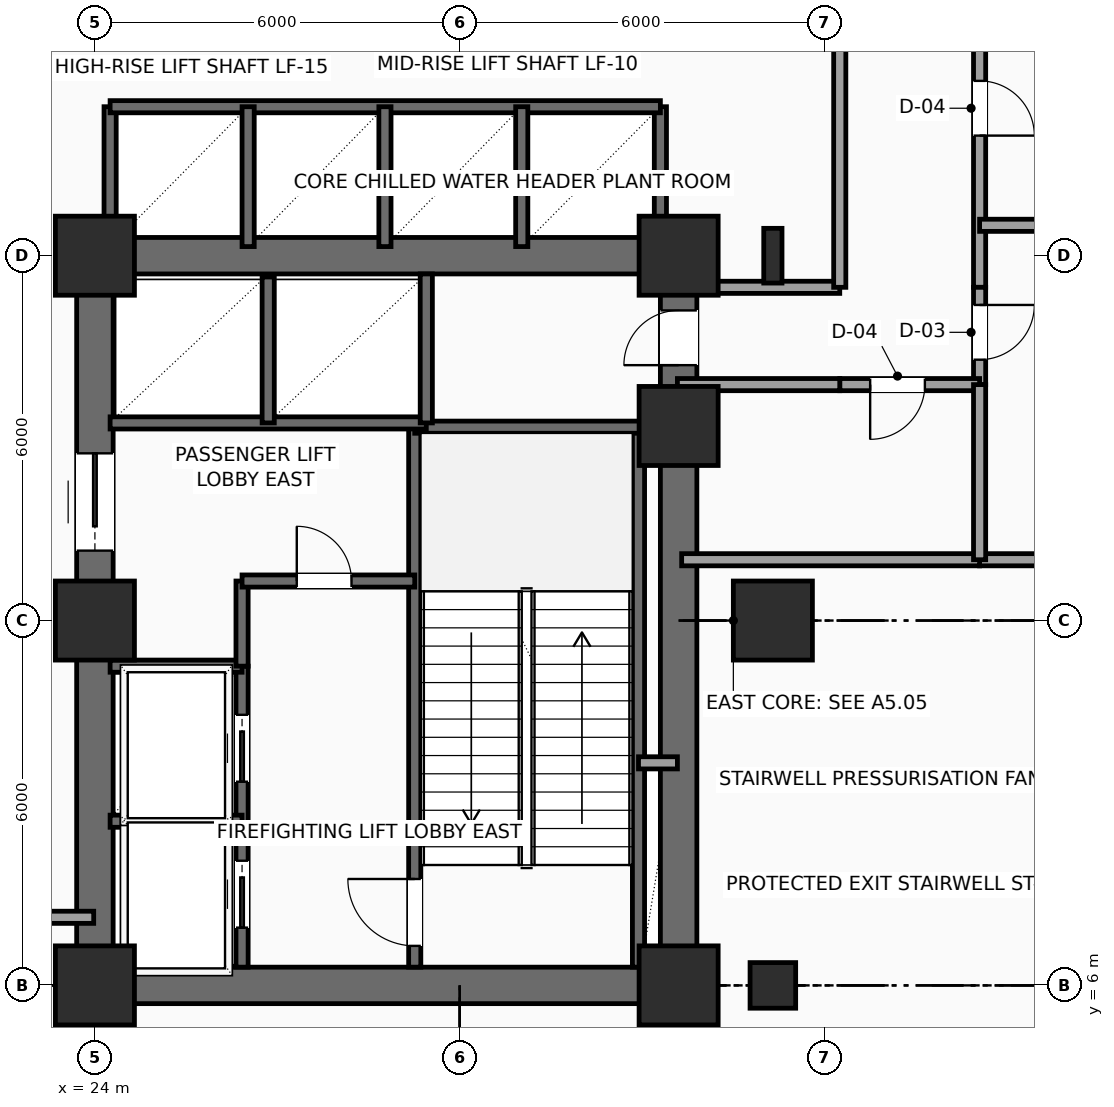
"""IFC4 building model, lengths in metres.
Left out: names, types, materials, properties, quantities, classifications, styles, units other than length and angle.
Written with IfcOpenShell. Run it as: python <this file> out.ifc"""

import sys

from ifc_helpers import new_model, si_unit, direction, frame, frame_2d, origin, origin_2d, place, context, subcontext, project, spatial, rectangle, hollow_rectangle, i_section, extrude, element, fill, save


model = new_model("IFC4")
c1 = context("Model", 3, precision=1e-05, world=origin(), true_north=direction((0.0, 1.0)))
c2 = subcontext(c1, "Body", "Model", "MODEL_VIEW")
j1 = project(units=[si_unit("LENGTHUNIT", "METRE"), si_unit("PLANEANGLEUNIT", "RADIAN")], contexts=[c1])
p1 = place(None, origin())
s1 = spatial("IfcSite", under=j1, at=p1, CompositionType="ELEMENT")
p2 = place(p1, origin())
s2 = spatial("IfcBuilding", under=s1, at=p2, CompositionType="ELEMENT")
p3 = place(p2, frame((0.0, 0.0, 94.8)))
s3 = spatial("IfcBuildingStorey", under=s2, at=p3, CompositionType="ELEMENT", Elevation=94.8)
for number, where, z_axis, x_axis in (
    (1, (24.0, 6.0, 0.0), (0.0, 0.0, 1.0), (1.0, 0.0, 0.0)),
    (2, (24.0, 12.0, 0.0), (0.0, 0.0, 1.0), (1.0, 0.0, 0.0)),
    (3, (24.0, 18.0, 0.0), (0.0, 0.0, 1.0), (1.0, 0.0, 0.0)),
    (4, (33.6, 6.0, 0.0), (0.0, 0.0, 1.0), (1.0, 0.0, 0.0)),
    (5, (33.6, 15.2, 0.0), (0.0, 0.0, 1.0), (1.0, 0.0, 0.0)),
    (6, (33.6, 18.0, 0.0), (0.0, 0.0, 1.0), (1.0, 0.0, 0.0)),
):
    element("IfcColumn", number, at=place(p3, frame(where, z_axis=z_axis, x_axis=x_axis)), inside=s3, PredefinedType="COLUMN", context=c2, shape_type="SweptSolid", body=[
        extrude(rectangle(XDim=1.3, YDim=1.3, at=origin_2d()), origin(), (0.0, 0.0, 1.0), 4.8),
    ])
p4 = place(p3, frame((35.15, 6.0, 0.0), z_axis=(0.0, 0.0, 1.0), x_axis=(1.0, 0.0, 0.0)))
e7 = element("IfcColumn", 7, at=p4, inside=s3, PredefinedType="COLUMN", context=c2, shape_type="SweptSolid", body=[
    extrude(hollow_rectangle(XDim=0.75, YDim=0.75, WallThickness=0.035, InnerFilletRadius=0.035, OuterFilletRadius=0.05, at=origin_2d()), origin(), (0.0, 0.0, 1.0), 4.8),
])
p5 = place(p3, frame((35.15, 12.0, 0.0), z_axis=(0.0, 0.0, 1.0), x_axis=(1.0, 0.0, 0.0)))
e8 = element("IfcColumn", 8, at=p5, inside=s3, PredefinedType="COLUMN", context=c2, shape_type="SweptSolid", body=[
    extrude(rectangle(XDim=1.3, YDim=1.3, at=origin_2d()), origin(), (0.0, 0.0, 1.0), 4.8),
])
p6 = place(p3, frame((35.15, 18.0, 0.0), z_axis=(0.0, 0.0, 1.0), x_axis=(1.0, 0.0, 0.0)))
e9 = element("IfcColumn", 9, at=p6, inside=s3, PredefinedType="COLUMN", context=c2, shape_type="SweptSolid", body=[
    extrude(i_section(OverallWidth=0.3, OverallDepth=0.9, WebThickness=0.019, FlangeThickness=0.035, FilletRadius=0.03, at=origin_2d()), origin(), (0.0, 0.0, 1.0), 4.8),
])
for number, where, z_axis, x_axis in (
    (10, (24.0, 6.0, 0.0), (0.0, 0.0, 1.0), (1.0, 0.0, 0.0)),
    (11, (24.0, 18.0, 0.0), (0.0, 0.0, 1.0), (1.0, 0.0, 0.0)),
):
    element("IfcWall", number, at=place(p3, frame(where, z_axis=z_axis, x_axis=x_axis)), inside=s3, PredefinedType="SHEAR", context=c2, shape_type="SweptSolid", body=[
        extrude(rectangle(XDim=9.6, YDim=0.6, at=frame_2d((4.8, 0.0))), origin(), (0.0, 0.0, 1.0), 4.575),
    ])
p7 = place(p3, frame((24.0, 6.0, 0.0), z_axis=(0.0, 0.0, 1.0), x_axis=(0.0, 1.0, 0.0)))
e12 = element("IfcWall", 12, at=p7, inside=s3, PredefinedType="SHEAR", context=c2, shape_type="SweptSolid", body=[
    extrude(rectangle(XDim=12.0, YDim=0.6, at=frame_2d((6.0, 0.0))), origin(), (0.0, 0.0, 1.0), 4.575),
])
p8 = place(p7, frame((7.15, 0.0, 0.0)))
e13 = element("IfcOpeningElement", 13, at=p8, cuts=e12, PredefinedType="OPENING", context=c2, shape_type="SweptSolid", body=[
    extrude(rectangle(XDim=1.6, YDim=2.3, at=frame_2d((0.8, 1.15))), frame((0.0, 0.31, 0.0), z_axis=(0.0, -1.0, 0.0), x_axis=(1.0, 0.0, 0.0)), (0.0, 0.0, 1.0), 0.62),
])
p9 = place(p3, frame((33.6, 6.0, 0.0), z_axis=(0.0, 0.0, 1.0), x_axis=(0.0, 1.0, 0.0)))
e14 = element("IfcWall", 14, at=p9, inside=s3, PredefinedType="SHEAR", context=c2, shape_type="SweptSolid", body=[
    extrude(rectangle(XDim=12.0, YDim=0.6, at=frame_2d((6.0, 0.0))), origin(), (0.0, 0.0, 1.0), 4.575),
])
p10 = place(p9, frame((10.2, 0.0, 0.0)))
e15 = element("IfcOpeningElement", 15, at=p10, cuts=e14, PredefinedType="OPENING", context=c2, shape_type="SweptSolid", body=[
    extrude(rectangle(XDim=0.9, YDim=2.15, at=frame_2d((0.45, 1.075))), frame((0.0, 0.31, 0.0), z_axis=(0.0, -1.0, 0.0), x_axis=(1.0, 0.0, 0.0)), (0.0, 0.0, 1.0), 0.62),
])
p11 = place(p3, frame((29.26, 6.3, 0.0), z_axis=(0.0, 0.0, 1.0), x_axis=(0.0, 1.0, 0.0)))
e16 = element("IfcWall", 16, at=p11, inside=s3, PredefinedType="SHEAR", context=c2, shape_type="SweptSolid", body=[
    extrude(rectangle(XDim=8.88, YDim=0.2, at=frame_2d((4.44, 0.0))), origin(), (0.0, 0.0, 1.0), 4.575),
])
p12 = place(p11, frame((0.35, 0.0, 0.0)))
e17 = element("IfcOpeningElement", 17, at=p12, cuts=e16, PredefinedType="OPENING", context=c2, shape_type="SweptSolid", body=[
    extrude(rectangle(XDim=1.1, YDim=2.2, at=frame_2d((0.55, 1.1))), frame((0.0, 0.11, 0.0), z_axis=(0.0, -1.0, 0.0), x_axis=(1.0, 0.0, 0.0)), (0.0, 0.0, 1.0), 0.22),
])
p13 = place(p3, frame((32.94, 6.3, 0.0), z_axis=(0.0, 0.0, 1.0), x_axis=(0.0, 1.0, 0.0)))
e18 = element("IfcWall", 18, at=p13, inside=s3, PredefinedType="SHEAR", context=c2, shape_type="SweptSolid", body=[
    extrude(rectangle(XDim=8.88, YDim=0.2, at=frame_2d((4.44, 0.0))), origin(), (0.0, 0.0, 1.0), 4.575),
])
p14 = place(p3, frame((29.26, 15.18, 0.0), z_axis=(0.0, 0.0, 1.0), x_axis=(1.0, 0.0, 0.0)))
e19 = element("IfcWall", 19, at=p14, inside=s3, PredefinedType="SHEAR", context=c2, shape_type="SweptSolid", body=[
    extrude(rectangle(XDim=4.04, YDim=0.2, at=frame_2d((2.02, 0.0))), origin(), (0.0, 0.0, 1.0), 4.575),
])
p15 = place(p3, frame((26.42, 6.3, 0.0), z_axis=(0.0, 0.0, 1.0), x_axis=(0.0, 1.0, 0.0)))
e20 = element("IfcWall", 20, at=p15, inside=s3, PredefinedType="SHEAR", context=c2, shape_type="SweptSolid", body=[
    extrude(rectangle(XDim=4.95, YDim=0.2, at=frame_2d((2.475, 0.0))), origin(), (0.0, 0.0, 1.0), 4.575),
])
p16 = place(p15, frame((0.65, 0.0, 0.0)))
e21 = element("IfcOpeningElement", 21, at=p16, cuts=e20, PredefinedType="OPENING", context=c2, shape_type="SweptSolid", body=[
    extrude(rectangle(XDim=1.1, YDim=2.2, at=frame_2d((0.55, 1.1))), frame((0.0, 0.11, 0.0), z_axis=(0.0, -1.0, 0.0), x_axis=(1.0, 0.0, 0.0)), (0.0, 0.0, 1.0), 0.22),
])
p17 = place(p15, frame((3.05, 0.0, 0.0)))
e22 = element("IfcOpeningElement", 22, at=p17, cuts=e20, PredefinedType="OPENING", context=c2, shape_type="SweptSolid", body=[
    extrude(rectangle(XDim=1.1, YDim=2.2, at=frame_2d((0.55, 1.1))), frame((0.0, 0.11, 0.0), z_axis=(0.0, -1.0, 0.0), x_axis=(1.0, 0.0, 0.0)), (0.0, 0.0, 1.0), 0.22),
])
for number, where, z_axis, x_axis in (
    (23, (24.25, 8.7, 0.0), (0.0, 0.0, 1.0), (1.0, 0.0, 0.0)),
    (24, (24.25, 11.25, 0.0), (0.0, 0.0, 1.0), (1.0, 0.0, 0.0)),
):
    element("IfcWall", number, at=place(p3, frame(where, z_axis=z_axis, x_axis=x_axis)), inside=s3, PredefinedType="SHEAR", context=c2, shape_type="SweptSolid", body=[
        extrude(rectangle(XDim=2.17, YDim=0.2, at=frame_2d((1.085, 0.0))), origin(), (0.0, 0.0, 1.0), 4.575),
    ])
p18 = place(p3, frame((26.42, 11.25, 0.0), z_axis=(0.0, 0.0, 1.0), x_axis=(0.0, 1.0, 0.0)))
e25 = element("IfcWall", 25, at=p18, inside=s3, PredefinedType="SHEAR", context=c2, shape_type="SweptSolid", body=[
    extrude(rectangle(XDim=1.4, YDim=0.2, at=frame_2d((0.7, 0.0))), origin(), (0.0, 0.0, 1.0), 4.575),
])
p19 = place(p3, frame((26.42, 12.65, 0.0), z_axis=(0.0, 0.0, 1.0), x_axis=(1.0, 0.0, 0.0)))
e26 = element("IfcWall", 26, at=p19, inside=s3, PredefinedType="SHEAR", context=c2, shape_type="SweptSolid", body=[
    extrude(rectangle(XDim=2.84, YDim=0.2, at=frame_2d((1.42, 0.0))), origin(), (0.0, 0.0, 1.0), 4.575),
])
p20 = place(p19, frame((0.9, 0.0, 0.0)))
e27 = element("IfcOpeningElement", 27, at=p20, cuts=e26, PredefinedType="OPENING", context=c2, shape_type="SweptSolid", body=[
    extrude(rectangle(XDim=0.9, YDim=2.15, at=frame_2d((0.45, 1.075))), frame((0.0, 0.11, 0.0), z_axis=(0.0, -1.0, 0.0), x_axis=(1.0, 0.0, 0.0)), (0.0, 0.0, 1.0), 0.22),
])
p21 = place(p3, frame((32.94, 9.66, 0.0), z_axis=(0.0, 0.0, 1.0), x_axis=(1.0, 0.0, 0.0)))
e28 = element("IfcWall", 28, at=p21, inside=s3, PredefinedType="SOLIDWALL", context=c2, shape_type="SweptSolid", body=[
    extrude(rectangle(XDim=0.64, YDim=0.2, at=frame_2d((0.32, 0.0))), origin(), (0.0, 0.0, 1.0), 4.575),
])
p22 = place(p3, frame((24.25, 15.25, 0.0), z_axis=(0.0, 0.0, 1.0), x_axis=(1.0, 0.0, 0.0)))
e29 = element("IfcWall", 29, at=p22, inside=s3, PredefinedType="SHEAR", context=c2, shape_type="SweptSolid", body=[
    extrude(rectangle(XDim=5.2, YDim=0.2, at=frame_2d((2.6, 0.0))), origin(), (0.0, 0.0, 1.0), 4.575),
])
p23 = place(p3, frame((26.85, 15.25, 0.0), z_axis=(0.0, 0.0, 1.0), x_axis=(0.0, 1.0, 0.0)))
e30 = element("IfcWall", 30, at=p23, inside=s3, PredefinedType="SHEAR", context=c2, shape_type="SweptSolid", body=[
    extrude(rectangle(XDim=2.4, YDim=0.2, at=frame_2d((1.2, 0.0))), origin(), (0.0, 0.0, 1.0), 4.575),
])
p24 = place(p3, frame((29.45, 15.25, 0.0), z_axis=(0.0, 0.0, 1.0), x_axis=(0.0, 1.0, 0.0)))
e31 = element("IfcWall", 31, at=p24, inside=s3, PredefinedType="SHEAR", context=c2, shape_type="SweptSolid", body=[
    extrude(rectangle(XDim=2.45, YDim=0.2, at=frame_2d((1.225, 0.0))), origin(), (0.0, 0.0, 1.0), 4.575),
])
for number, where, z_axis, x_axis in (
    (32, (33.3, 18.1, 0.0), (0.0, 0.0, 1.0), (0.0, 1.0, 0.0)),
    (33, (24.25, 18.1, 0.0), (0.0, 0.0, 1.0), (0.0, 1.0, 0.0)),
):
    element("IfcWall", number, at=place(p3, frame(where, z_axis=z_axis, x_axis=x_axis)), inside=s3, PredefinedType="SHEAR", context=c2, shape_type="SweptSolid", body=[
        extrude(rectangle(XDim=2.35, YDim=0.2, at=frame_2d((1.175, 0.0))), origin(), (0.0, 0.0, 1.0), 4.575),
    ])
p25 = place(p3, frame((24.25, 20.45, 0.0), z_axis=(0.0, 0.0, 1.0), x_axis=(1.0, 0.0, 0.0)))
e34 = element("IfcWall", 34, at=p25, inside=s3, PredefinedType="SHEAR", context=c2, shape_type="SweptSolid", body=[
    extrude(rectangle(XDim=9.05, YDim=0.2, at=frame_2d((4.525, 0.0))), origin(), (0.0, 0.0, 1.0), 4.575),
])
for number, where, z_axis, x_axis in (
    (35, (26.52, 18.15, 0.0), (0.0, 0.0, 1.0), (0.0, 1.0, 0.0)),
    (36, (28.77, 18.15, 0.0), (0.0, 0.0, 1.0), (0.0, 1.0, 0.0)),
    (37, (31.02, 18.15, 0.0), (0.0, 0.0, 1.0), (0.0, 1.0, 0.0)),
):
    element("IfcWall", number, at=place(p3, frame(where, z_axis=z_axis, x_axis=x_axis)), inside=s3, PredefinedType="SHEAR", context=c2, shape_type="SweptSolid", body=[
        extrude(rectangle(XDim=2.3, YDim=0.2, at=frame_2d((1.15, 0.0))), origin(), (0.0, 0.0, 1.0), 4.575),
    ])
p26 = place(p3, frame((38.55, 21.6, 0.0), z_axis=(0.0, 0.0, 1.0), x_axis=(0.0, -1.0, 0.0)))
e38 = element("IfcWall", 38, at=p26, inside=s3, PredefinedType="SOLIDWALL", context=c2, shape_type="SweptSolid", body=[
    extrude(rectangle(XDim=4.12, YDim=0.2, at=frame_2d((2.06, 0.0))), origin(), (0.0, 0.0, 1.0), 4.575),
])
p27 = place(p26, frame((0.725, 0.0, 0.0)))
e39 = element("IfcOpeningElement", 39, at=p27, cuts=e38, PredefinedType="OPENING", context=c2, shape_type="SweptSolid", body=[
    extrude(rectangle(XDim=0.9, YDim=2.15, at=frame_2d((0.45, 1.075))), frame((0.0, 0.11, 0.0), z_axis=(0.0, -1.0, 0.0), x_axis=(1.0, 0.0, 0.0)), (0.0, 0.0, 1.0), 0.22),
])
p28 = place(p3, frame((38.55, 17.48, 0.0), z_axis=(0.0, 0.0, 1.0), x_axis=(0.0, -1.0, 0.0)))
e40 = element("IfcWall", 40, at=p28, inside=s3, PredefinedType="SOLIDWALL", context=c2, shape_type="SweptSolid", body=[
    extrude(rectangle(XDim=1.6, YDim=0.2, at=frame_2d((0.8, 0.0))), origin(), (0.0, 0.0, 1.0), 4.575),
])
p29 = place(p28, frame((0.29, 0.0, 0.0)))
e41 = element("IfcOpeningElement", 41, at=p29, cuts=e40, PredefinedType="OPENING", context=c2, shape_type="SweptSolid", body=[
    extrude(rectangle(XDim=0.9, YDim=2.15, at=frame_2d((0.45, 1.075))), frame((0.0, 0.11, 0.0), z_axis=(0.0, -1.0, 0.0), x_axis=(1.0, 0.0, 0.0)), (0.0, 0.0, 1.0), 0.22),
])
p30 = place(p3, frame((38.55, 15.88, 0.0), z_axis=(0.0, 0.0, 1.0), x_axis=(-1.0, 0.0, 0.0)))
e42 = element("IfcWall", 42, at=p30, inside=s3, PredefinedType="SOLIDWALL", context=c2, shape_type="SweptSolid", body=[
    extrude(rectangle(XDim=2.3, YDim=0.2, at=frame_2d((1.15, 0.0))), origin(), (0.0, 0.0, 1.0), 4.575),
])
p31 = place(p30, frame((0.9, 0.0, 0.0)))
e43 = element("IfcOpeningElement", 43, at=p31, cuts=e42, PredefinedType="OPENING", context=c2, shape_type="SweptSolid", body=[
    extrude(rectangle(XDim=0.9, YDim=2.15, at=frame_2d((0.45, 1.075))), frame((0.0, 0.11, 0.0), z_axis=(0.0, -1.0, 0.0), x_axis=(1.0, 0.0, 0.0)), (0.0, 0.0, 1.0), 0.22),
])
for number, where, z_axis, x_axis in (
    (44, (36.25, 15.88, 0.0), (0.0, 0.0, 1.0), (-1.0, 0.0, 0.0)),
    (45, (33.58, 17.48, 0.0), (0.0, 0.0, 1.0), (1.0, 0.0, 0.0)),
):
    element("IfcWall", number, at=place(p3, frame(where, z_axis=z_axis, x_axis=x_axis)), inside=s3, PredefinedType="SOLIDWALL", context=c2, shape_type="SweptSolid", body=[
        extrude(rectangle(XDim=2.67, YDim=0.2, at=frame_2d((1.335, 0.0))), origin(), (0.0, 0.0, 1.0), 4.575),
    ])
p32 = place(p3, frame((36.25, 17.48, 0.0), z_axis=(0.0, 0.0, 1.0), x_axis=(0.0, 1.0, 0.0)))
e46 = element("IfcWall", 46, at=p32, inside=s3, PredefinedType="SOLIDWALL", context=c2, shape_type="SweptSolid", body=[
    extrude(rectangle(XDim=4.12, YDim=0.2, at=frame_2d((2.06, 0.0))), origin(), (0.0, 0.0, 1.0), 4.575),
])
p33 = place(p3, frame((23.98, 7.12, 0.0), z_axis=(0.0, 0.0, 1.0), x_axis=(-1.0, 0.0, 0.0)))
e47 = element("IfcWall", 47, at=p33, inside=s3, PredefinedType="SOLIDWALL", context=c2, shape_type="SweptSolid", body=[
    extrude(rectangle(XDim=3.23, YDim=0.2, at=frame_2d((1.615, 0.0))), origin(), (0.0, 0.0, 1.0), 4.575),
])
for number, where, z_axis, x_axis in (
    (48, (38.55, 13.0, 0.0), (0.0, 0.0, 1.0), (1.0, 0.0, 0.0)),
    (49, (38.55, 18.5, 0.0), (0.0, 0.0, 1.0), (1.0, 0.0, 0.0)),
):
    element("IfcWall", number, at=place(p3, frame(where, z_axis=z_axis, x_axis=x_axis)), inside=s3, PredefinedType="SOLIDWALL", context=c2, shape_type="SweptSolid", body=[
        extrude(rectangle(XDim=14.6, YDim=0.2, at=frame_2d((7.3, 0.0))), origin(), (0.0, 0.0, 1.0), 4.575),
    ])
p34 = place(p3, frame((33.65, 13.0, 0.0), z_axis=(0.0, 0.0, 1.0), x_axis=(1.0, 0.0, 0.0)))
e50 = element("IfcWall", 50, at=p34, inside=s3, PredefinedType="SOLIDWALL", context=c2, shape_type="SweptSolid", body=[
    extrude(rectangle(XDim=4.9, YDim=0.2, at=frame_2d((2.45, 0.0))), origin(), (0.0, 0.0, 1.0), 4.575),
])
p35 = place(p3, frame((38.55, 13.0, 0.0), z_axis=(0.0, 0.0, 1.0), x_axis=(0.0, 1.0, 0.0)))
e51 = element("IfcWall", 51, at=p35, inside=s3, PredefinedType="SOLIDWALL", context=c2, shape_type="SweptSolid", body=[
    extrude(rectangle(XDim=2.88, YDim=0.2, at=frame_2d((1.44, 0.0))), origin(), (0.0, 0.0, 1.0), 4.575),
])
p36 = place(p8, origin())
e52 = element("IfcDoor", 52, at=p36, inside=s3, OperationType="DOUBLE_DOOR_SLIDING", PredefinedType="DOOR", context=c2, shape_type="SweptSolid", body=[
    extrude(rectangle(XDim=1.6, YDim=2.3, at=frame_2d((0.8, 1.15))), frame((0.0, 0.025, 0.0), z_axis=(0.0, -1.0, 0.0), x_axis=(1.0, 0.0, 0.0)), (0.0, 0.0, 1.0), 0.05),
])
fill(e13, e52)
p37 = place(p10, origin())
e53 = element("IfcDoor", 53, at=p37, inside=s3, OperationType="SINGLE_SWING_LEFT", PredefinedType="DOOR", context=c2, shape_type="SweptSolid", body=[
    extrude(rectangle(XDim=0.9, YDim=2.15, at=frame_2d((0.45, 1.075))), frame((0.0, 0.025, 0.0), z_axis=(0.0, -1.0, 0.0), x_axis=(1.0, 0.0, 0.0)), (0.0, 0.0, 1.0), 0.05),
])
fill(e15, e53)
p38 = place(p12, origin())
e54 = element("IfcDoor", 54, at=p38, inside=s3, OperationType="SINGLE_SWING_RIGHT", PredefinedType="DOOR", context=c2, shape_type="SweptSolid", body=[
    extrude(rectangle(XDim=1.1, YDim=2.2, at=frame_2d((0.55, 1.1))), frame((0.0, 0.025, 0.0), z_axis=(0.0, -1.0, 0.0), x_axis=(1.0, 0.0, 0.0)), (0.0, 0.0, 1.0), 0.05),
])
fill(e17, e54)
p39 = place(p16, origin())
e55 = element("IfcDoor", 55, at=p39, inside=s3, OperationType="SLIDING_TO_LEFT", PredefinedType="DOOR", context=c2, shape_type="SweptSolid", body=[
    extrude(rectangle(XDim=1.1, YDim=2.2, at=frame_2d((0.55, 1.1))), frame((0.0, 0.025, 0.0), z_axis=(0.0, -1.0, 0.0), x_axis=(1.0, 0.0, 0.0)), (0.0, 0.0, 1.0), 0.05),
])
fill(e21, e55)
p40 = place(p17, origin())
e56 = element("IfcDoor", 56, at=p40, inside=s3, OperationType="SLIDING_TO_LEFT", PredefinedType="DOOR", context=c2, shape_type="SweptSolid", body=[
    extrude(rectangle(XDim=1.1, YDim=2.2, at=frame_2d((0.55, 1.1))), frame((0.0, 0.025, 0.0), z_axis=(0.0, -1.0, 0.0), x_axis=(1.0, 0.0, 0.0)), (0.0, 0.0, 1.0), 0.05),
])
fill(e22, e56)
p41 = place(p20, origin())
e57 = element("IfcDoor", 57, at=p41, inside=s3, OperationType="SINGLE_SWING_LEFT", PredefinedType="DOOR", context=c2, shape_type="SweptSolid", body=[
    extrude(rectangle(XDim=0.9, YDim=2.15, at=frame_2d((0.45, 1.075))), frame((0.0, 0.025, 0.0), z_axis=(0.0, -1.0, 0.0), x_axis=(1.0, 0.0, 0.0)), (0.0, 0.0, 1.0), 0.05),
])
fill(e27, e57)
p42 = place(p27, origin())
e58 = element("IfcDoor", 58, at=p42, inside=s3, OperationType="SINGLE_SWING_RIGHT", PredefinedType="DOOR", context=c2, shape_type="SweptSolid", body=[
    extrude(rectangle(XDim=0.9, YDim=2.15, at=frame_2d((0.45, 1.075))), frame((0.0, 0.025, 0.0), z_axis=(0.0, -1.0, 0.0), x_axis=(1.0, 0.0, 0.0)), (0.0, 0.0, 1.0), 0.05),
])
fill(e39, e58)
p43 = place(p29, origin())
e59 = element("IfcDoor", 59, at=p43, inside=s3, OperationType="SINGLE_SWING_LEFT", PredefinedType="DOOR", context=c2, shape_type="SweptSolid", body=[
    extrude(rectangle(XDim=0.9, YDim=2.15, at=frame_2d((0.45, 1.075))), frame((0.0, 0.025, 0.0), z_axis=(0.0, -1.0, 0.0), x_axis=(1.0, 0.0, 0.0)), (0.0, 0.0, 1.0), 0.05),
])
fill(e41, e59)
p44 = place(p31, origin())
e60 = element("IfcDoor", 60, at=p44, inside=s3, OperationType="SINGLE_SWING_RIGHT", PredefinedType="DOOR", context=c2, shape_type="SweptSolid", body=[
    extrude(rectangle(XDim=0.9, YDim=2.15, at=frame_2d((0.45, 1.075))), frame((0.0, 0.025, 0.0), z_axis=(0.0, -1.0, 0.0), x_axis=(1.0, 0.0, 0.0)), (0.0, 0.0, 1.0), 0.05),
])
fill(e43, e60)
save(model, sys.argv[1])
